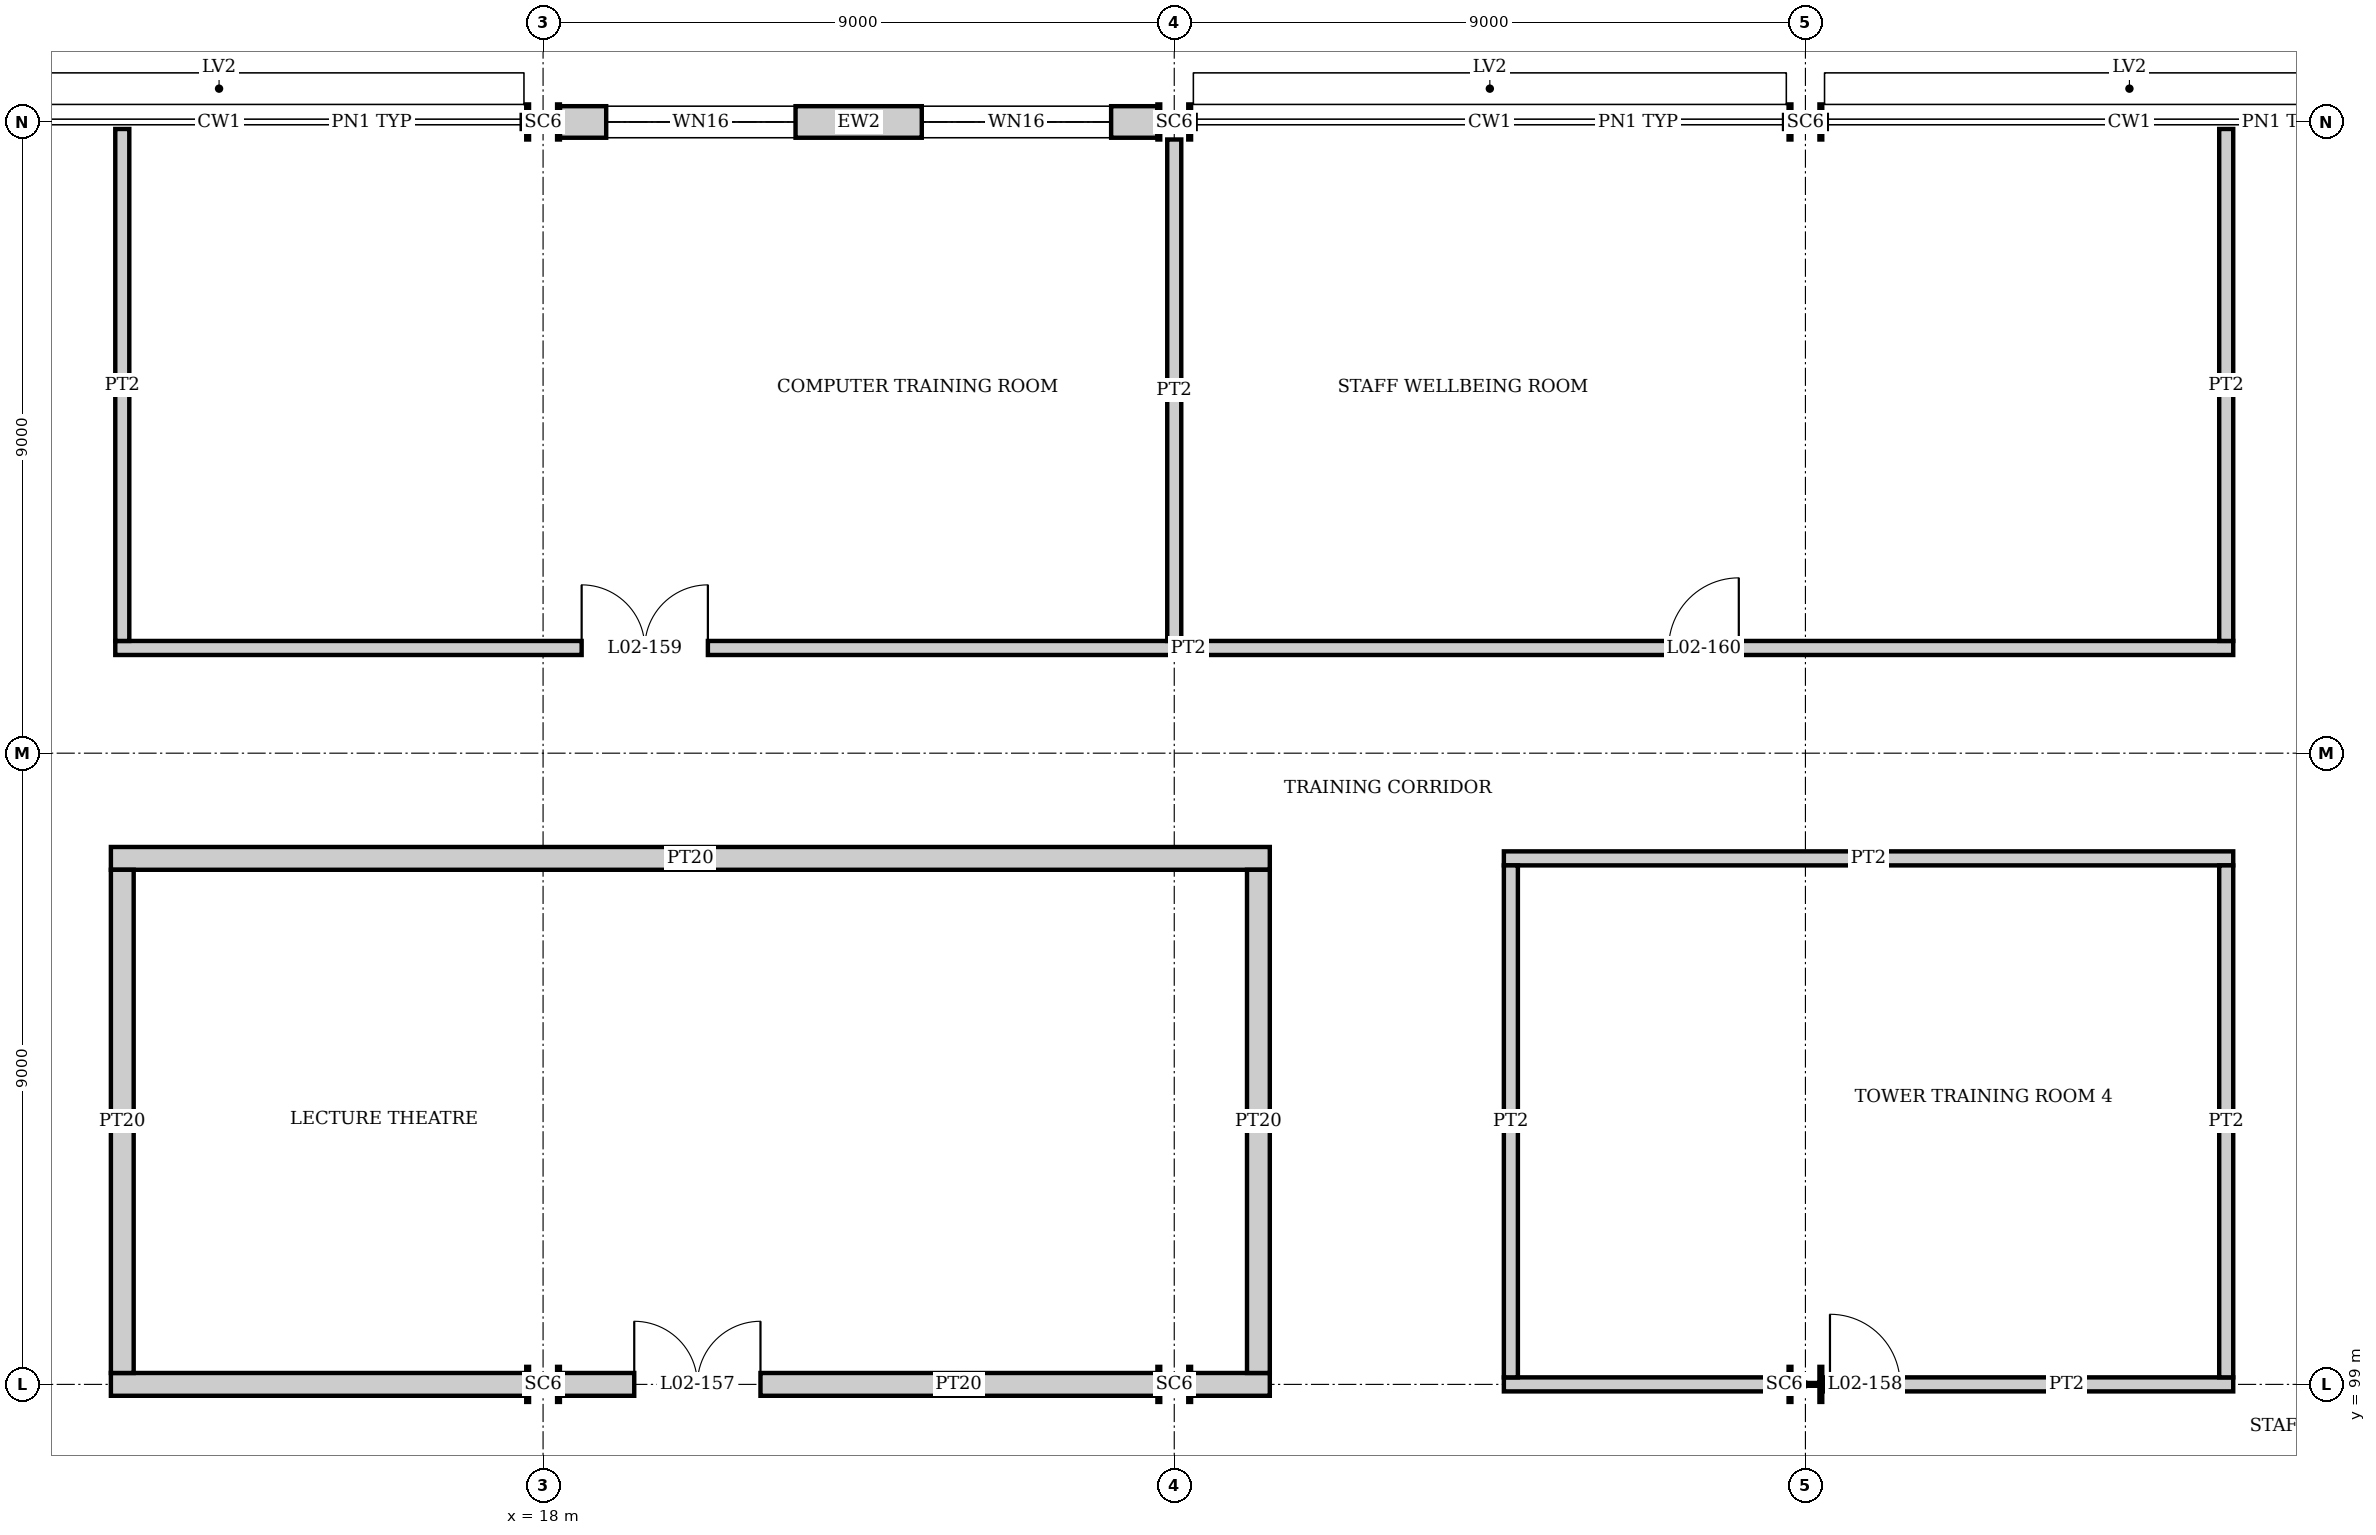
"""IFC4 building model, lengths in metres.
Left out: names, types, materials, properties, quantities, classifications, styles, units other than length and angle.
Written with IfcOpenShell. Run it as: python <this file> out.ifc"""

import sys

from ifc_helpers import new_model, si_unit, direction, frame, frame_2d, origin, origin_2d, place, context, subcontext, project, spatial, rectangle, i_section, extrude, element, fill, save


model = new_model("IFC4")
c1 = context("Model", 3, precision=1e-05, world=origin(), true_north=direction((0.0, 1.0)))
c2 = subcontext(c1, "Body", "Model", "MODEL_VIEW")
j1 = project(units=[si_unit("LENGTHUNIT", "METRE"), si_unit("PLANEANGLEUNIT", "RADIAN")], contexts=[c1])
p1 = place(None, origin())
s1 = spatial("IfcSite", under=j1, at=p1, CompositionType="ELEMENT")
p2 = place(p1, origin())
s2 = spatial("IfcBuilding", under=s1, at=p2, CompositionType="ELEMENT")
p3 = place(p2, frame((0.0, 0.0, 10.5)))
s3 = spatial("IfcBuildingStorey", under=s2, at=p3, CompositionType="ELEMENT", Elevation=10.5)
for number, where, z_axis, x_axis in (
    (1, (18.0, 99.0, 0.0), (0.0, 0.0, 1.0), (0.0, 1.0, 0.0)),
    (2, (18.0, 117.0, 0.0), (0.0, 0.0, 1.0), (0.0, 1.0, 0.0)),
    (3, (27.0, 99.0, 0.0), (0.0, 0.0, 1.0), (0.0, 1.0, 0.0)),
    (4, (27.0, 117.0, 0.0), (0.0, 0.0, 1.0), (0.0, 1.0, 0.0)),
    (5, (36.0, 99.0, 0.0), (0.0, 0.0, 1.0), (0.0, 1.0, 0.0)),
    (6, (36.0, 117.0, 0.0), (0.0, 0.0, 1.0), (0.0, 1.0, 0.0)),
):
    element("IfcColumn", number, at=place(p3, frame(where, z_axis=z_axis, x_axis=x_axis)), inside=s3, PredefinedType="COLUMN", context=c2, shape_type="SweptSolid", body=[
        extrude(i_section(OverallWidth=0.5, OverallDepth=0.48, WebThickness=0.04, FlangeThickness=0.04, at=origin_2d()), origin(), (0.0, 0.0, 1.0), 4.5),
    ])
p4 = place(p3, frame((18.24, 117.0, 0.0), z_axis=(0.0, 0.0, 1.0), x_axis=(1.0, 0.0, 0.0)))
e7 = element("IfcWall", 7, at=p4, inside=s3, PredefinedType="SOLIDWALL", context=c2, shape_type="SweptSolid", body=[
    extrude(rectangle(XDim=8.52, YDim=0.45, at=frame_2d((4.26, 0.0))), origin(), (0.0, 0.0, 1.0), 3.54),
])
p5 = place(p4, frame((0.66, 0.0, 0.9)))
e8 = element("IfcOpeningElement", 8, at=p5, cuts=e7, PredefinedType="OPENING", context=c2, shape_type="SweptSolid", body=[
    extrude(rectangle(XDim=2.7, YDim=1.8, at=frame_2d((1.35, 0.9))), frame((0.0, 0.235, 0.0), z_axis=(0.0, -1.0, 0.0), x_axis=(1.0, 0.0, 0.0)), (0.0, 0.0, 1.0), 0.47),
])
p6 = place(p4, frame((5.16, 0.0, 0.9)))
e9 = element("IfcOpeningElement", 9, at=p6, cuts=e7, PredefinedType="OPENING", context=c2, shape_type="SweptSolid", body=[
    extrude(rectangle(XDim=2.7, YDim=1.8, at=frame_2d((1.35, 0.9))), frame((0.0, 0.235, 0.0), z_axis=(0.0, -1.0, 0.0), x_axis=(1.0, 0.0, 0.0)), (0.0, 0.0, 1.0), 0.47),
])
p7 = place(p3, frame((11.837, 99.0, 0.0), z_axis=(0.0, 0.0, 1.0), x_axis=(1.0, 0.0, 0.0)))
e10 = element("IfcWall", 10, at=p7, inside=s3, PredefinedType="PARTITIONING", context=c2, shape_type="SweptSolid", body=[
    extrude(rectangle(XDim=5.913, YDim=0.325, at=frame_2d((2.956, 0.0))), origin(), (0.0, 0.0, 1.0), 3.54),
])
p8 = place(p3, frame((18.25, 99.0, 0.0), z_axis=(0.0, 0.0, 1.0), x_axis=(1.0, 0.0, 0.0)))
e11 = element("IfcWall", 11, at=p8, inside=s3, PredefinedType="PARTITIONING", context=c2, shape_type="SweptSolid", body=[
    extrude(rectangle(XDim=8.5, YDim=0.325, at=frame_2d((4.25, 0.0))), origin(), (0.0, 0.0, 1.0), 3.54),
])
p9 = place(p8, frame((1.05, 0.0, 0.0)))
e12 = element("IfcOpeningElement", 12, at=p9, cuts=e11, PredefinedType="OPENING", context=c2, shape_type="SweptSolid", body=[
    extrude(rectangle(XDim=1.8, YDim=2.4, at=frame_2d((0.9, 1.2))), frame((0.0, 0.172, 0.0), z_axis=(0.0, -1.0, 0.0), x_axis=(1.0, 0.0, 0.0)), (0.0, 0.0, 1.0), 0.345),
])
p10 = place(p3, frame((27.25, 99.0, 0.0), z_axis=(0.0, 0.0, 1.0), x_axis=(1.0, 0.0, 0.0)))
e13 = element("IfcWall", 13, at=p10, inside=s3, PredefinedType="PARTITIONING", context=c2, shape_type="SweptSolid", body=[
    extrude(rectangle(XDim=1.113, YDim=0.325, at=frame_2d((0.556, 0.0))), origin(), (0.0, 0.0, 1.0), 3.54),
])
p11 = place(p3, frame((31.7, 99.0, 0.0), z_axis=(0.0, 0.0, 1.0), x_axis=(1.0, 0.0, 0.0)))
e14 = element("IfcWall", 14, at=p11, inside=s3, PredefinedType="PARTITIONING", context=c2, shape_type="SweptSolid", body=[
    extrude(rectangle(XDim=4.05, YDim=0.2, at=frame_2d((2.025, 0.0))), origin(), (0.0, 0.0, 1.0), 3.54),
])
p12 = place(p3, frame((36.25, 99.0, 0.0), z_axis=(0.0, 0.0, 1.0), x_axis=(1.0, 0.0, 0.0)))
e15 = element("IfcWall", 15, at=p12, inside=s3, PredefinedType="PARTITIONING", context=c2, shape_type="SweptSolid", body=[
    extrude(rectangle(XDim=5.85, YDim=0.2, at=frame_2d((2.925, 0.0))), origin(), (0.0, 0.0, 1.0), 3.54),
])
p13 = place(p12, frame((0.1, 0.0, 0.0)))
e16 = element("IfcOpeningElement", 16, at=p13, cuts=e15, PredefinedType="OPENING", context=c2, shape_type="SweptSolid", body=[
    extrude(rectangle(XDim=1.0, YDim=2.1, at=frame_2d((0.5, 1.05))), frame((0.0, 0.11, 0.0), z_axis=(0.0, -1.0, 0.0), x_axis=(1.0, 0.0, 0.0)), (0.0, 0.0, 1.0), 0.22),
])
p14 = place(p3, frame((11.837, 106.5, 0.0), z_axis=(0.0, 0.0, 1.0), x_axis=(1.0, 0.0, 0.0)))
e17 = element("IfcWall", 17, at=p14, inside=s3, PredefinedType="PARTITIONING", context=c2, shape_type="SweptSolid", body=[
    extrude(rectangle(XDim=16.525, YDim=0.325, at=frame_2d((8.263, 0.0))), origin(), (0.0, 0.0, 1.0), 3.55),
])
p15 = place(p3, frame((31.7, 106.5, 0.0), z_axis=(0.0, 0.0, 1.0), x_axis=(1.0, 0.0, 0.0)))
e18 = element("IfcWall", 18, at=p15, inside=s3, PredefinedType="PARTITIONING", context=c2, shape_type="SweptSolid", body=[
    extrude(rectangle(XDim=10.4, YDim=0.2, at=frame_2d((5.2, 0.0))), origin(), (0.0, 0.0, 1.0), 3.55),
])
p16 = place(p3, frame((11.9, 109.5, 0.0), z_axis=(0.0, 0.0, 1.0), x_axis=(1.0, 0.0, 0.0)))
e19 = element("IfcWall", 19, at=p16, inside=s3, PredefinedType="PARTITIONING", context=c2, shape_type="SweptSolid", body=[
    extrude(rectangle(XDim=30.2, YDim=0.2, at=frame_2d((15.1, 0.0))), origin(), (0.0, 0.0, 1.0), 3.55),
])
p17 = place(p16, frame((6.65, 0.0, 0.0)))
e20 = element("IfcOpeningElement", 20, at=p17, cuts=e19, PredefinedType="OPENING", context=c2, shape_type="SweptSolid", body=[
    extrude(rectangle(XDim=1.8, YDim=2.1, at=frame_2d((0.9, 1.05))), frame((0.0, 0.11, 0.0), z_axis=(0.0, -1.0, 0.0), x_axis=(1.0, 0.0, 0.0)), (0.0, 0.0, 1.0), 0.22),
])
p18 = place(p16, frame((22.15, 0.0, 0.0)))
e21 = element("IfcOpeningElement", 21, at=p18, cuts=e19, PredefinedType="OPENING", context=c2, shape_type="SweptSolid", body=[
    extrude(rectangle(XDim=1.0, YDim=2.1, at=frame_2d((0.5, 1.05))), frame((0.0, 0.11, 0.0), z_axis=(0.0, -1.0, 0.0), x_axis=(1.0, 0.0, 0.0)), (0.0, 0.0, 1.0), 0.22),
])
p19 = place(p3, frame((12.0, 99.163, 0.0), z_axis=(0.0, 0.0, 1.0), x_axis=(0.0, 1.0, 0.0)))
e22 = element("IfcWall", 22, at=p19, inside=s3, PredefinedType="PARTITIONING", context=c2, shape_type="SweptSolid", body=[
    extrude(rectangle(XDim=7.175, YDim=0.325, at=frame_2d((3.587, 0.0))), origin(), (0.0, 0.0, 1.0), 3.54),
])
p20 = place(p3, frame((12.0, 109.6, 0.0), z_axis=(0.0, 0.0, 1.0), x_axis=(0.0, 1.0, 0.0)))
e23 = element("IfcWall", 23, at=p20, inside=s3, PredefinedType="PARTITIONING", context=c2, shape_type="SweptSolid", body=[
    extrude(rectangle(XDim=7.3, YDim=0.2, at=frame_2d((3.65, 0.0))), origin(), (0.0, 0.0, 1.0), 4.35),
])
p21 = place(p3, frame((27.0, 109.6, 0.0), z_axis=(0.0, 0.0, 1.0), x_axis=(0.0, 1.0, 0.0)))
e24 = element("IfcWall", 24, at=p21, inside=s3, PredefinedType="PARTITIONING", context=c2, shape_type="SweptSolid", body=[
    extrude(rectangle(XDim=7.15, YDim=0.2, at=frame_2d((3.575, 0.0))), origin(), (0.0, 0.0, 1.0), 3.55),
])
p22 = place(p3, frame((28.2, 99.163, 0.0), z_axis=(0.0, 0.0, 1.0), x_axis=(0.0, 1.0, 0.0)))
e25 = element("IfcWall", 25, at=p22, inside=s3, PredefinedType="PARTITIONING", context=c2, shape_type="SweptSolid", body=[
    extrude(rectangle(XDim=7.175, YDim=0.325, at=frame_2d((3.587, 0.0))), origin(), (0.0, 0.0, 1.0), 3.54),
])
for number, where, z_axis, x_axis in (
    (26, (31.8, 99.1, 0.0), (0.0, 0.0, 1.0), (0.0, 1.0, 0.0)),
    (27, (42.0, 99.1, 0.0), (0.0, 0.0, 1.0), (0.0, 1.0, 0.0)),
):
    element("IfcWall", number, at=place(p3, frame(where, z_axis=z_axis, x_axis=x_axis)), inside=s3, PredefinedType="PARTITIONING", context=c2, shape_type="SweptSolid", body=[
        extrude(rectangle(XDim=7.3, YDim=0.2, at=frame_2d((3.65, 0.0))), origin(), (0.0, 0.0, 1.0), 3.54),
    ])
p23 = place(p3, frame((42.0, 109.6, 0.0), z_axis=(0.0, 0.0, 1.0), x_axis=(0.0, 1.0, 0.0)))
e28 = element("IfcWall", 28, at=p23, inside=s3, PredefinedType="PARTITIONING", context=c2, shape_type="SweptSolid", body=[
    extrude(rectangle(XDim=7.3, YDim=0.2, at=frame_2d((3.65, 0.0))), origin(), (0.0, 0.0, 1.0), 4.35),
])
p24 = place(p5, origin())
e29 = element("IfcWindow", 29, at=p24, inside=s3, PartitioningType="SINGLE_PANEL", PredefinedType="WINDOW", context=c2, shape_type="SweptSolid", body=[
    extrude(rectangle(XDim=2.7, YDim=1.8, at=frame_2d((1.35, 0.9))), frame((0.0, 0.03, 0.0), z_axis=(0.0, -1.0, 0.0), x_axis=(1.0, 0.0, 0.0)), (0.0, 0.0, 1.0), 0.06),
])
fill(e8, e29)
p25 = place(p6, origin())
e30 = element("IfcWindow", 30, at=p25, inside=s3, PartitioningType="SINGLE_PANEL", PredefinedType="WINDOW", context=c2, shape_type="SweptSolid", body=[
    extrude(rectangle(XDim=2.7, YDim=1.8, at=frame_2d((1.35, 0.9))), frame((0.0, 0.03, 0.0), z_axis=(0.0, -1.0, 0.0), x_axis=(1.0, 0.0, 0.0)), (0.0, 0.0, 1.0), 0.06),
])
fill(e9, e30)
p26 = place(p9, origin())
e31 = element("IfcDoor", 31, at=p26, inside=s3, OperationType="DOUBLE_DOOR_SINGLE_SWING", PredefinedType="DOOR", context=c2, shape_type="SweptSolid", body=[
    extrude(rectangle(XDim=1.8, YDim=2.4, at=frame_2d((0.9, 1.2))), frame((0.0, 0.025, 0.0), z_axis=(0.0, -1.0, 0.0), x_axis=(1.0, 0.0, 0.0)), (0.0, 0.0, 1.0), 0.05),
])
fill(e12, e31)
p27 = place(p13, origin())
e32 = element("IfcDoor", 32, at=p27, inside=s3, OperationType="SINGLE_SWING_LEFT", PredefinedType="DOOR", context=c2, shape_type="SweptSolid", body=[
    extrude(rectangle(XDim=1.0, YDim=2.1, at=frame_2d((0.5, 1.05))), frame((0.0, 0.025, 0.0), z_axis=(0.0, -1.0, 0.0), x_axis=(1.0, 0.0, 0.0)), (0.0, 0.0, 1.0), 0.05),
])
fill(e16, e32)
p28 = place(p17, origin())
e33 = element("IfcDoor", 33, at=p28, inside=s3, OperationType="DOUBLE_DOOR_SINGLE_SWING", PredefinedType="DOOR", context=c2, shape_type="SweptSolid", body=[
    extrude(rectangle(XDim=1.8, YDim=2.1, at=frame_2d((0.9, 1.05))), frame((0.0, 0.025, 0.0), z_axis=(0.0, -1.0, 0.0), x_axis=(1.0, 0.0, 0.0)), (0.0, 0.0, 1.0), 0.05),
])
fill(e20, e33)
p29 = place(p18, origin())
e34 = element("IfcDoor", 34, at=p29, inside=s3, OperationType="SINGLE_SWING_RIGHT", PredefinedType="DOOR", context=c2, shape_type="SweptSolid", body=[
    extrude(rectangle(XDim=1.0, YDim=2.1, at=frame_2d((0.5, 1.05))), frame((0.0, 0.025, 0.0), z_axis=(0.0, -1.0, 0.0), x_axis=(1.0, 0.0, 0.0)), (0.0, 0.0, 1.0), 0.05),
])
fill(e21, e34)
save(model, sys.argv[1])
